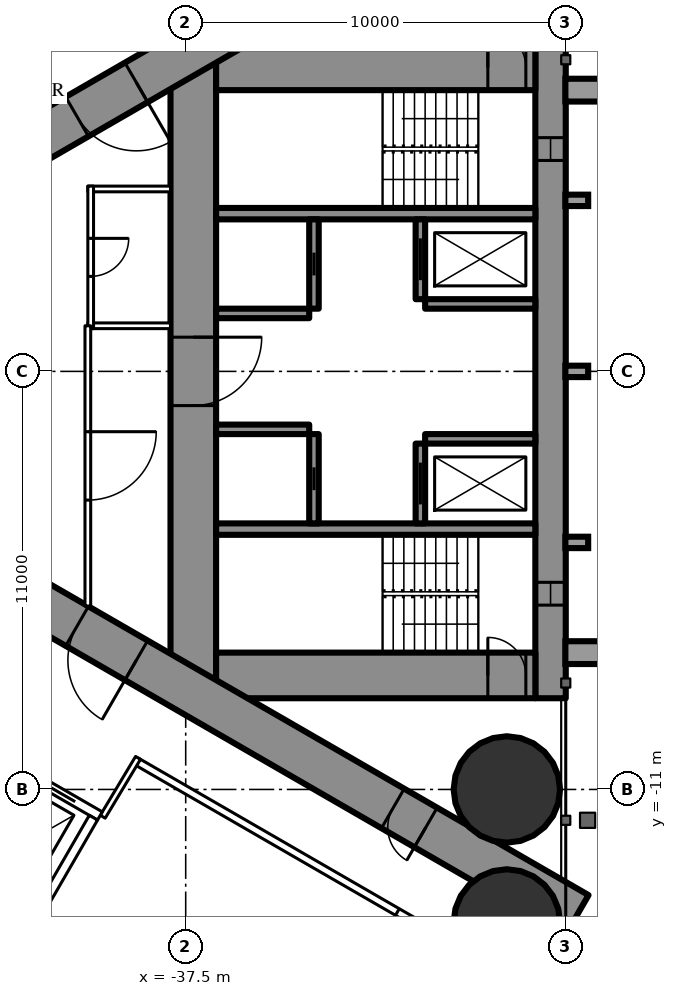
"""IFC4 building model, lengths in metres.
Left out: names, types, materials, properties, quantities, classifications, styles, units other than length and angle.
Written with IfcOpenShell. Run it as: python <this file> out.ifc"""

import sys

from ifc_helpers import new_model, si_unit, direction, frame, frame_2d, origin, origin_2d, place, context, subcontext, project, spatial, rectangle, circle, extrude, element, fill, save


model = new_model("IFC4")
c1 = context("Model", 3, precision=1e-05, world=origin(), true_north=direction((0.0, 1.0)))
c2 = subcontext(c1, "Body", "Model", "MODEL_VIEW")
j1 = project(units=[si_unit("LENGTHUNIT", "METRE"), si_unit("PLANEANGLEUNIT", "RADIAN")], contexts=[c1])
p1 = place(None, origin())
s1 = spatial("IfcSite", under=j1, at=p1, CompositionType="ELEMENT")
p2 = place(p1, origin())
s2 = spatial("IfcBuilding", under=s1, at=p2, CompositionType="ELEMENT")
p3 = place(p2, frame((0.0, 0.0, 184.3)))
s3 = spatial("IfcBuildingStorey", under=s2, at=p3, CompositionType="ELEMENT", Elevation=184.3)
for number, where, z_axis, x_axis in (
    (1, (-29.05, -11.0, 0.0), (0.0, 0.0, 1.0), (1.0, 0.0, 0.0)),
    (2, (-29.05, -14.5, 0.0), (0.0, 0.0, 1.0), (1.0, 0.0, 0.0)),
):
    element("IfcColumn", number, at=place(p3, frame(where, z_axis=z_axis, x_axis=x_axis)), inside=s3, PredefinedType="COLUMN", context=c2, shape_type="SweptSolid", body=[
        extrude(circle(Radius=1.4, at=origin_2d()), origin(), (0.0, 0.0, 1.0), 3.5),
    ])
p4 = place(p3, frame((-27.9, 8.6, 0.0), z_axis=(0.0, 0.0, 1.0), x_axis=(0.0, -1.0, 0.0)))
e3 = element("IfcWall", 3, at=p4, inside=s3, PredefinedType="SHEAR", context=c2, shape_type="SweptSolid", body=[
    extrude(rectangle(XDim=17.2, YDim=0.8, at=frame_2d((8.6, 0.0))), origin(), (0.0, 0.0, 1.0), 3.5),
])
p5 = place(p4, frame((2.45, 0.0, 0.6)))
e4 = element("IfcOpeningElement", 4, at=p5, cuts=e3, PredefinedType="OPENING", context=c2, shape_type="SweptSolid", body=[
    extrude(rectangle(XDim=0.6, YDim=2.1, at=frame_2d((0.3, 1.05))), frame((0.0, 0.41, 0.0), z_axis=(0.0, -1.0, 0.0), x_axis=(1.0, 0.0, 0.0)), (0.0, 0.0, 1.0), 0.82),
])
p6 = place(p4, frame((14.15, 0.0, 0.6)))
e5 = element("IfcOpeningElement", 5, at=p6, cuts=e3, PredefinedType="OPENING", context=c2, shape_type="SweptSolid", body=[
    extrude(rectangle(XDim=0.6, YDim=2.1, at=frame_2d((0.3, 1.05))), frame((0.0, 0.41, 0.0), z_axis=(0.0, -1.0, 0.0), x_axis=(1.0, 0.0, 0.0)), (0.0, 0.0, 1.0), 0.82),
])
p7 = place(p3, frame((-37.3, 8.6, 0.0), z_axis=(0.0, 0.0, 1.0), x_axis=(0.0, -1.0, 0.0)))
e6 = element("IfcWall", 6, at=p7, inside=s3, PredefinedType="SHEAR", context=c2, shape_type="SweptSolid", body=[
    extrude(rectangle(XDim=17.2, YDim=1.2, at=frame_2d((8.6, 0.0))), origin(), (0.0, 0.0, 1.0), 3.5),
])
p8 = place(p7, frame((7.7, 0.0, 0.0)))
e7 = element("IfcOpeningElement", 7, at=p8, cuts=e6, PredefinedType="OPENING", context=c2, shape_type="SweptSolid", body=[
    extrude(rectangle(XDim=1.8, YDim=2.2, at=frame_2d((0.9, 1.1))), frame((0.0, 0.61, 0.0), z_axis=(0.0, -1.0, 0.0), x_axis=(1.0, 0.0, 0.0)), (0.0, 0.0, 1.0), 1.22),
])
p9 = place(p3, frame((-28.3, 8.0, 0.0), z_axis=(0.0, 0.0, 1.0), x_axis=(-1.0, 0.0, 0.0)))
e8 = element("IfcWall", 8, at=p9, inside=s3, PredefinedType="SHEAR", context=c2, shape_type="SweptSolid", body=[
    extrude(rectangle(XDim=8.4, YDim=1.2, at=frame_2d((4.2, 0.0))), origin(), (0.0, 0.0, 1.0), 3.5),
])
p10 = place(p9, frame((0.25, 0.0, 0.0)))
e9 = element("IfcOpeningElement", 9, at=p10, cuts=e8, PredefinedType="OPENING", context=c2, shape_type="SweptSolid", body=[
    extrude(rectangle(XDim=1.0, YDim=2.2, at=frame_2d((0.5, 1.1))), frame((0.0, 0.61, 0.0), z_axis=(0.0, -1.0, 0.0), x_axis=(1.0, 0.0, 0.0)), (0.0, 0.0, 1.0), 1.22),
])
p11 = place(p3, frame((-28.3, -8.0, 0.0), z_axis=(0.0, 0.0, 1.0), x_axis=(-1.0, 0.0, 0.0)))
e10 = element("IfcWall", 10, at=p11, inside=s3, PredefinedType="SHEAR", context=c2, shape_type="SweptSolid", body=[
    extrude(rectangle(XDim=8.4, YDim=1.2, at=frame_2d((4.2, 0.0))), origin(), (0.0, 0.0, 1.0), 3.5),
])
p12 = place(p11, frame((0.25, 0.0, 0.0)))
e11 = element("IfcOpeningElement", 11, at=p12, cuts=e10, PredefinedType="OPENING", context=c2, shape_type="SweptSolid", body=[
    extrude(rectangle(XDim=1.0, YDim=2.2, at=frame_2d((0.5, 1.1))), frame((0.0, 0.61, 0.0), z_axis=(0.0, -1.0, 0.0), x_axis=(1.0, 0.0, 0.0)), (0.0, 0.0, 1.0), 1.22),
])
for number, where, z_axis, x_axis in (
    (12, (-28.3, 4.15, 0.0), (0.0, 0.0, 1.0), (-1.0, 0.0, 0.0)),
    (13, (-28.3, -4.15, 0.0), (0.0, 0.0, 1.0), (-1.0, 0.0, 0.0)),
):
    element("IfcWall", number, at=place(p3, frame(where, z_axis=z_axis, x_axis=x_axis)), inside=s3, PredefinedType="SHEAR", context=c2, shape_type="SweptSolid", body=[
        extrude(rectangle(XDim=8.4, YDim=0.3, at=frame_2d((4.2, 0.0))), origin(), (0.0, 0.0, 1.0), 3.5),
    ])
p13 = place(p3, frame((-31.325, 4.0, 0.0), z_axis=(0.0, 0.0, 1.0), x_axis=(0.0, -1.0, 0.0)))
e14 = element("IfcWall", 14, at=p13, inside=s3, PredefinedType="SHEAR", context=c2, shape_type="SweptSolid", body=[
    extrude(rectangle(XDim=2.1, YDim=0.25, at=frame_2d((1.05, 0.0))), origin(), (0.0, 0.0, 1.0), 3.5),
])
p14 = place(p13, frame((0.5, 0.0, 0.0)))
e15 = element("IfcOpeningElement", 15, at=p14, cuts=e14, PredefinedType="OPENING", context=c2, shape_type="SweptSolid", body=[
    extrude(rectangle(XDim=1.1, YDim=2.2, at=frame_2d((0.55, 1.1))), frame((0.0, 0.135, 0.0), z_axis=(0.0, -1.0, 0.0), x_axis=(1.0, 0.0, 0.0)), (0.0, 0.0, 1.0), 0.27),
])
p15 = place(p3, frame((-34.125, 4.0, 0.0), z_axis=(0.0, 0.0, 1.0), x_axis=(0.0, -1.0, 0.0)))
e16 = element("IfcWall", 16, at=p15, inside=s3, PredefinedType="SHEAR", context=c2, shape_type="SweptSolid", body=[
    extrude(rectangle(XDim=2.35, YDim=0.25, at=frame_2d((1.175, 0.0))), origin(), (0.0, 0.0, 1.0), 3.5),
])
p16 = place(p15, frame((0.875, 0.0, 0.0)))
e17 = element("IfcOpeningElement", 17, at=p16, cuts=e16, PredefinedType="OPENING", context=c2, shape_type="SweptSolid", body=[
    extrude(rectangle(XDim=0.6, YDim=2.0, at=frame_2d((0.3, 1.0))), frame((0.0, 0.135, 0.0), z_axis=(0.0, -1.0, 0.0), x_axis=(1.0, 0.0, 0.0)), (0.0, 0.0, 1.0), 0.27),
])
p17 = place(p3, frame((-28.3, 1.775, 0.0), z_axis=(0.0, 0.0, 1.0), x_axis=(-1.0, 0.0, 0.0)))
e18 = element("IfcWall", 18, at=p17, inside=s3, PredefinedType="SHEAR", context=c2, shape_type="SweptSolid", body=[
    extrude(rectangle(XDim=2.9, YDim=0.25, at=frame_2d((1.45, 0.0))), origin(), (0.0, 0.0, 1.0), 3.5),
])
p18 = place(p3, frame((-34.25, 1.525, 0.0), z_axis=(0.0, 0.0, 1.0), x_axis=(-1.0, 0.0, 0.0)))
e19 = element("IfcWall", 19, at=p18, inside=s3, PredefinedType="SHEAR", context=c2, shape_type="SweptSolid", body=[
    extrude(rectangle(XDim=2.45, YDim=0.25, at=frame_2d((1.225, 0.0))), origin(), (0.0, 0.0, 1.0), 3.5),
])
p19 = place(p3, frame((-31.325, -1.9, 0.0), z_axis=(0.0, 0.0, 1.0), x_axis=(0.0, -1.0, 0.0)))
e20 = element("IfcWall", 20, at=p19, inside=s3, PredefinedType="SHEAR", context=c2, shape_type="SweptSolid", body=[
    extrude(rectangle(XDim=2.1, YDim=0.25, at=frame_2d((1.05, 0.0))), origin(), (0.0, 0.0, 1.0), 3.5),
])
p20 = place(p19, frame((0.5, 0.0, 0.0)))
e21 = element("IfcOpeningElement", 21, at=p20, cuts=e20, PredefinedType="OPENING", context=c2, shape_type="SweptSolid", body=[
    extrude(rectangle(XDim=1.1, YDim=2.2, at=frame_2d((0.55, 1.1))), frame((0.0, 0.135, 0.0), z_axis=(0.0, -1.0, 0.0), x_axis=(1.0, 0.0, 0.0)), (0.0, 0.0, 1.0), 0.27),
])
p21 = place(p3, frame((-34.125, -1.65, 0.0), z_axis=(0.0, 0.0, 1.0), x_axis=(0.0, -1.0, 0.0)))
e22 = element("IfcWall", 22, at=p21, inside=s3, PredefinedType="SHEAR", context=c2, shape_type="SweptSolid", body=[
    extrude(rectangle(XDim=2.35, YDim=0.25, at=frame_2d((1.175, 0.0))), origin(), (0.0, 0.0, 1.0), 3.5),
])
p22 = place(p21, frame((0.875, 0.0, 0.0)))
e23 = element("IfcOpeningElement", 23, at=p22, cuts=e22, PredefinedType="OPENING", context=c2, shape_type="SweptSolid", body=[
    extrude(rectangle(XDim=0.6, YDim=2.0, at=frame_2d((0.3, 1.0))), frame((0.0, 0.135, 0.0), z_axis=(0.0, -1.0, 0.0), x_axis=(1.0, 0.0, 0.0)), (0.0, 0.0, 1.0), 0.27),
])
p23 = place(p3, frame((-28.3, -1.775, 0.0), z_axis=(0.0, 0.0, 1.0), x_axis=(-1.0, 0.0, 0.0)))
e24 = element("IfcWall", 24, at=p23, inside=s3, PredefinedType="SHEAR", context=c2, shape_type="SweptSolid", body=[
    extrude(rectangle(XDim=2.9, YDim=0.25, at=frame_2d((1.45, 0.0))), origin(), (0.0, 0.0, 1.0), 3.5),
])
p24 = place(p3, frame((-34.25, -1.525, 0.0), z_axis=(0.0, 0.0, 1.0), x_axis=(-1.0, 0.0, 0.0)))
e25 = element("IfcWall", 25, at=p24, inside=s3, PredefinedType="SHEAR", context=c2, shape_type="SweptSolid", body=[
    extrude(rectangle(XDim=2.45, YDim=0.25, at=frame_2d((1.225, 0.0))), origin(), (0.0, 0.0, 1.0), 3.5),
])
p25 = place(p3, frame((-27.2, 14.3, 0.0), z_axis=(0.0, 0.0, 1.0), x_axis=(-0.866026593062, -0.499997940104, 0.0)))
e26 = element("IfcWall", 26, at=p25, inside=s3, PredefinedType="SHEAR", context=c2, shape_type="SweptSolid", body=[
    extrude(rectangle(XDim=28.946, YDim=1.2, at=frame_2d((14.473, 0.0))), origin(), (0.0, 0.0, 1.0), 3.5),
])
p26 = place(p25, frame((4.6, 0.0, 0.0)))
e27 = element("IfcOpeningElement", 27, at=p26, cuts=e26, PredefinedType="OPENING", context=c2, shape_type="SweptSolid", body=[
    extrude(rectangle(XDim=1.0, YDim=2.2, at=frame_2d((0.5, 1.1))), frame((0.0, 0.61, 0.0), z_axis=(0.0, -1.0, 0.0), x_axis=(1.0, 0.0, 0.0)), (0.0, 0.0, 1.0), 1.22),
])
p27 = place(p25, frame((13.395, 0.0, 0.0)))
e28 = element("IfcOpeningElement", 28, at=p27, cuts=e26, PredefinedType="OPENING", context=c2, shape_type="SweptSolid", body=[
    extrude(rectangle(XDim=1.8, YDim=2.2, at=frame_2d((0.9, 1.1))), frame((0.0, 0.61, 0.0), z_axis=(0.0, -1.0, 0.0), x_axis=(1.0, 0.0, 0.0)), (0.0, 0.0, 1.0), 1.22),
])
p28 = place(p3, frame((-27.2, -14.3, 0.0), z_axis=(0.0, 0.0, 1.0), x_axis=(-0.866024021859, 0.500002393557, 0.0)))
e29 = element("IfcWall", 29, at=p28, inside=s3, PredefinedType="SHEAR", context=c2, shape_type="SweptSolid", body=[
    extrude(rectangle(XDim=27.907, YDim=1.2, at=frame_2d((13.954, 0.0))), origin(), (0.0, 0.0, 1.0), 3.5),
])
p29 = place(p28, frame((4.6, 0.0, 0.0)))
e30 = element("IfcOpeningElement", 30, at=p29, cuts=e29, PredefinedType="OPENING", context=c2, shape_type="SweptSolid", body=[
    extrude(rectangle(XDim=1.0, YDim=2.2, at=frame_2d((0.5, 1.1))), frame((0.0, 0.61, 0.0), z_axis=(0.0, -1.0, 0.0), x_axis=(1.0, 0.0, 0.0)), (0.0, 0.0, 1.0), 1.22),
])
p30 = place(p28, frame((13.395, 0.0, 0.0)))
e31 = element("IfcOpeningElement", 31, at=p30, cuts=e29, PredefinedType="OPENING", context=c2, shape_type="SweptSolid", body=[
    extrude(rectangle(XDim=1.8, YDim=2.2, at=frame_2d((0.9, 1.1))), frame((0.0, 0.61, 0.0), z_axis=(0.0, -1.0, 0.0), x_axis=(1.0, 0.0, 0.0)), (0.0, 0.0, 1.0), 1.22),
])
p31 = place(p3, frame((-27.86, -16.575, 0.0), z_axis=(0.0, 0.0, 1.0), x_axis=(-0.866027756871, 0.499995924312, 0.0)))
e32 = element("IfcWall", 32, at=p31, inside=s3, PredefinedType="PARTITIONING", context=c2, shape_type="SweptSolid", body=[
    extrude(rectangle(XDim=12.622, YDim=0.2, at=frame_2d((6.311, 0.0))), origin(), (0.0, 0.0, 1.0), 3.25),
])
p32 = place(p31, frame((3.75, 0.0, 0.0)))
e33 = element("IfcOpeningElement", 33, at=p32, cuts=e32, PredefinedType="OPENING", context=c2, shape_type="SweptSolid", body=[
    extrude(rectangle(XDim=0.95, YDim=2.2, at=frame_2d((0.475, 1.1))), frame((0.0, 0.11, 0.0), z_axis=(0.0, -1.0, 0.0), x_axis=(1.0, 0.0, 0.0)), (0.0, 0.0, 1.0), 0.22),
])
p33 = place(p3, frame((-39.683, -11.718, 0.0), z_axis=(0.0, 0.0, 1.0), x_axis=(0.514336634837, 0.857588377991, 0.0)))
e34 = element("IfcWall", 34, at=p33, inside=s3, PredefinedType="PARTITIONING", context=c2, shape_type="SweptSolid", body=[
    extrude(rectangle(XDim=1.805, YDim=0.15, at=frame_2d((0.903, 0.0))), origin(), (0.0, 0.0, 1.0), 3.25),
])
for number, where, z_axis, x_axis in (
    (35, (-37.9, 1.2, 0.0), (0.0, 0.0, 1.0), (-1.0, 0.0, 0.0)),
    (36, (-37.9, 4.8, 0.0), (0.0, 0.0, 1.0), (-1.0, 0.0, 0.0)),
):
    element("IfcWall", number, at=place(p3, frame(where, z_axis=z_axis, x_axis=x_axis)), inside=s3, PredefinedType="PARTITIONING", context=c2, shape_type="SweptSolid", body=[
        extrude(rectangle(XDim=2.175, YDim=0.15, at=frame_2d((1.087, 0.0))), origin(), (0.0, 0.0, 1.0), 3.25),
    ])
p34 = place(p3, frame((-40.0, 4.875, 0.0), z_axis=(0.0, 0.0, 1.0), x_axis=(0.0, -1.0, 0.0)))
e37 = element("IfcWall", 37, at=p34, inside=s3, PredefinedType="PARTITIONING", context=c2, shape_type="SweptSolid", body=[
    extrude(rectangle(XDim=3.75, YDim=0.15, at=frame_2d((1.875, 0.0))), origin(), (0.0, 0.0, 1.0), 3.25),
])
p35 = place(p34, frame((1.375, 0.0, 0.0)))
e38 = element("IfcOpeningElement", 38, at=p35, cuts=e37, PredefinedType="OPENING", context=c2, shape_type="SweptSolid", body=[
    extrude(rectangle(XDim=1.0, YDim=2.2, at=frame_2d((0.5, 1.1))), frame((0.0, 0.085, 0.0), z_axis=(0.0, -1.0, 0.0), x_axis=(1.0, 0.0, 0.0)), (0.0, 0.0, 1.0), 0.17),
])
p36 = place(p3, frame((-40.075, 1.2, 0.0), z_axis=(0.0, 0.0, 1.0), x_axis=(0.0, -1.0, 0.0)))
e39 = element("IfcWall", 39, at=p36, inside=s3, PredefinedType="PARTITIONING", context=c2, shape_type="SweptSolid", body=[
    extrude(rectangle(XDim=7.374, YDim=0.15, at=frame_2d((3.687, 0.0))), origin(), (0.0, 0.0, 1.0), 3.25),
])
p37 = place(p36, frame((2.787, 0.0, 0.0)))
e40 = element("IfcOpeningElement", 40, at=p37, cuts=e39, PredefinedType="OPENING", context=c2, shape_type="SweptSolid", body=[
    extrude(rectangle(XDim=1.8, YDim=2.2, at=frame_2d((0.9, 1.1))), frame((0.0, 0.085, 0.0), z_axis=(0.0, -1.0, 0.0), x_axis=(1.0, 0.0, 0.0)), (0.0, 0.0, 1.0), 0.17),
])
p38 = place(p3, frame((-39.758, -11.697, 0.0), z_axis=(0.0, 0.0, 1.0), x_axis=(-0.866024194504, 0.500002094529, 0.0)))
e41 = element("IfcWall", 41, at=p38, inside=s3, PredefinedType="PARTITIONING", context=c2, shape_type="SweptSolid", body=[
    extrude(rectangle(XDim=6.6, YDim=0.25, at=frame_2d((3.3, 0.0))), origin(), (0.0, 0.0, 1.0), 3.25),
])
p39 = place(p38, frame((0.75, 0.0, 0.0)))
e42 = element("IfcOpeningElement", 42, at=p39, cuts=e41, PredefinedType="OPENING", context=c2, shape_type="SweptSolid", body=[
    extrude(rectangle(XDim=1.1, YDim=2.2, at=frame_2d((0.55, 1.1))), frame((0.0, 0.135, 0.0), z_axis=(0.0, -1.0, 0.0), x_axis=(1.0, 0.0, 0.0)), (0.0, 0.0, 1.0), 0.27),
])
p40 = place(p38, frame((2.75, 0.0, 0.0)))
e43 = element("IfcOpeningElement", 43, at=p40, cuts=e41, PredefinedType="OPENING", context=c2, shape_type="SweptSolid", body=[
    extrude(rectangle(XDim=1.1, YDim=2.2, at=frame_2d((0.55, 1.1))), frame((0.0, 0.135, 0.0), z_axis=(0.0, -1.0, 0.0), x_axis=(1.0, 0.0, 0.0)), (0.0, 0.0, 1.0), 0.27),
])
p41 = place(p38, frame((4.75, 0.0, 0.0)))
e44 = element("IfcOpeningElement", 44, at=p41, cuts=e41, PredefinedType="OPENING", context=c2, shape_type="SweptSolid", body=[
    extrude(rectangle(XDim=1.1, YDim=2.2, at=frame_2d((0.55, 1.1))), frame((0.0, 0.135, 0.0), z_axis=(0.0, -1.0, 0.0), x_axis=(1.0, 0.0, 0.0)), (0.0, 0.0, 1.0), 0.27),
])
p42 = place(p3, frame((-39.928, -11.743, 0.0), z_axis=(0.0, 0.0, 1.0), x_axis=(-0.499929347863, -0.866066190972, 0.0)))
e45 = element("IfcWall", 45, at=p42, inside=s3, PredefinedType="PARTITIONING", context=c2, shape_type="SweptSolid", body=[
    extrude(rectangle(XDim=3.201, YDim=0.25, at=frame_2d((1.6, 0.0))), origin(), (0.0, 0.0, 1.0), 3.25),
])
p43 = place(p32, origin())
e46 = element("IfcDoor", 46, at=p43, inside=s3, OperationType="SINGLE_SWING_LEFT", PredefinedType="DOOR", context=c2, shape_type="SweptSolid", body=[
    extrude(rectangle(XDim=0.95, YDim=2.2, at=frame_2d((0.475, 1.1))), frame((0.0, 0.025, 0.0), z_axis=(0.0, -1.0, 0.0), x_axis=(1.0, 0.0, 0.0)), (0.0, 0.0, 1.0), 0.05),
])
fill(e33, e46)
p44 = place(p35, origin())
e47 = element("IfcDoor", 47, at=p44, inside=s3, OperationType="SINGLE_SWING_LEFT", PredefinedType="DOOR", context=c2, shape_type="SweptSolid", body=[
    extrude(rectangle(XDim=1.0, YDim=2.2, at=frame_2d((0.5, 1.1))), frame((0.0, 0.025, 0.0), z_axis=(0.0, -1.0, 0.0), x_axis=(1.0, 0.0, 0.0)), (0.0, 0.0, 1.0), 0.05),
])
fill(e38, e47)
p45 = place(p37, origin())
e48 = element("IfcDoor", 48, at=p45, inside=s3, OperationType="DOUBLE_DOOR_SINGLE_SWING", PredefinedType="DOOR", context=c2, shape_type="SweptSolid", body=[
    extrude(rectangle(XDim=1.8, YDim=2.2, at=frame_2d((0.9, 1.1))), frame((0.0, 0.025, 0.0), z_axis=(0.0, -1.0, 0.0), x_axis=(1.0, 0.0, 0.0)), (0.0, 0.0, 1.0), 0.05),
])
fill(e40, e48)
p46 = place(p27, origin())
e49 = element("IfcDoor", 49, at=p46, inside=s3, OperationType="DOUBLE_DOOR_SINGLE_SWING", PredefinedType="DOOR", context=c2, shape_type="SweptSolid", body=[
    extrude(rectangle(XDim=1.8, YDim=2.2, at=frame_2d((0.9, 1.1))), frame((0.0, 0.025, 0.0), z_axis=(0.0, -1.0, 0.0), x_axis=(1.0, 0.0, 0.0)), (0.0, 0.0, 1.0), 0.05),
])
fill(e28, e49)
p47 = place(p29, origin())
e50 = element("IfcDoor", 50, at=p47, inside=s3, OperationType="SINGLE_SWING_LEFT", PredefinedType="DOOR", context=c2, shape_type="SweptSolid", body=[
    extrude(rectangle(XDim=1.0, YDim=2.2, at=frame_2d((0.5, 1.1))), frame((0.0, 0.025, 0.0), z_axis=(0.0, -1.0, 0.0), x_axis=(1.0, 0.0, 0.0)), (0.0, 0.0, 1.0), 0.05),
])
fill(e30, e50)
p48 = place(p30, origin())
e51 = element("IfcDoor", 51, at=p48, inside=s3, OperationType="DOUBLE_DOOR_SINGLE_SWING", PredefinedType="DOOR", context=c2, shape_type="SweptSolid", body=[
    extrude(rectangle(XDim=1.8, YDim=2.2, at=frame_2d((0.9, 1.1))), frame((0.0, 0.025, 0.0), z_axis=(0.0, -1.0, 0.0), x_axis=(1.0, 0.0, 0.0)), (0.0, 0.0, 1.0), 0.05),
])
fill(e31, e51)
p49 = place(p8, origin())
e52 = element("IfcDoor", 52, at=p49, inside=s3, OperationType="DOUBLE_DOOR_SINGLE_SWING", PredefinedType="DOOR", context=c2, shape_type="SweptSolid", body=[
    extrude(rectangle(XDim=1.8, YDim=2.2, at=frame_2d((0.9, 1.1))), frame((0.0, 0.025, 0.0), z_axis=(0.0, -1.0, 0.0), x_axis=(1.0, 0.0, 0.0)), (0.0, 0.0, 1.0), 0.05),
])
fill(e7, e52)
p50 = place(p10, origin())
e53 = element("IfcDoor", 53, at=p50, inside=s3, OperationType="SINGLE_SWING_RIGHT", PredefinedType="DOOR", context=c2, shape_type="SweptSolid", body=[
    extrude(rectangle(XDim=1.0, YDim=2.2, at=frame_2d((0.5, 1.1))), frame((0.0, 0.025, 0.0), z_axis=(0.0, -1.0, 0.0), x_axis=(1.0, 0.0, 0.0)), (0.0, 0.0, 1.0), 0.05),
])
fill(e9, e53)
p51 = place(p12, origin())
e54 = element("IfcDoor", 54, at=p51, inside=s3, OperationType="SINGLE_SWING_RIGHT", PredefinedType="DOOR", context=c2, shape_type="SweptSolid", body=[
    extrude(rectangle(XDim=1.0, YDim=2.2, at=frame_2d((0.5, 1.1))), frame((0.0, 0.025, 0.0), z_axis=(0.0, -1.0, 0.0), x_axis=(1.0, 0.0, 0.0)), (0.0, 0.0, 1.0), 0.05),
])
fill(e11, e54)
p52 = place(p14, origin())
e55 = element("IfcDoor", 55, at=p52, inside=s3, OperationType="SLIDING_TO_LEFT", PredefinedType="USERDEFINED", context=c2, shape_type="SweptSolid", body=[
    extrude(rectangle(XDim=1.1, YDim=2.2, at=frame_2d((0.55, 1.1))), frame((0.0, 0.025, 0.0), z_axis=(0.0, -1.0, 0.0), x_axis=(1.0, 0.0, 0.0)), (0.0, 0.0, 1.0), 0.05),
])
fill(e15, e55)
p53 = place(p20, origin())
e56 = element("IfcDoor", 56, at=p53, inside=s3, OperationType="SLIDING_TO_LEFT", PredefinedType="USERDEFINED", context=c2, shape_type="SweptSolid", body=[
    extrude(rectangle(XDim=1.1, YDim=2.2, at=frame_2d((0.55, 1.1))), frame((0.0, 0.025, 0.0), z_axis=(0.0, -1.0, 0.0), x_axis=(1.0, 0.0, 0.0)), (0.0, 0.0, 1.0), 0.05),
])
fill(e21, e56)
p54 = place(p16, origin())
e57 = element("IfcDoor", 57, at=p54, inside=s3, OperationType="SLIDING_TO_LEFT", PredefinedType="DOOR", context=c2, shape_type="SweptSolid", body=[
    extrude(rectangle(XDim=0.6, YDim=2.0, at=frame_2d((0.3, 1.0))), frame((0.0, 0.025, 0.0), z_axis=(0.0, -1.0, 0.0), x_axis=(1.0, 0.0, 0.0)), (0.0, 0.0, 1.0), 0.05),
])
fill(e17, e57)
p55 = place(p22, origin())
e58 = element("IfcDoor", 58, at=p55, inside=s3, OperationType="SLIDING_TO_LEFT", PredefinedType="DOOR", context=c2, shape_type="SweptSolid", body=[
    extrude(rectangle(XDim=0.6, YDim=2.0, at=frame_2d((0.3, 1.0))), frame((0.0, 0.025, 0.0), z_axis=(0.0, -1.0, 0.0), x_axis=(1.0, 0.0, 0.0)), (0.0, 0.0, 1.0), 0.05),
])
fill(e23, e58)
p56 = place(p39, origin())
e59 = element("IfcDoor", 59, at=p56, inside=s3, OperationType="DOUBLE_DOOR_SLIDING", PredefinedType="USERDEFINED", context=c2, shape_type="SweptSolid", body=[
    extrude(rectangle(XDim=1.1, YDim=2.2, at=frame_2d((0.55, 1.1))), frame((0.0, 0.025, 0.0), z_axis=(0.0, -1.0, 0.0), x_axis=(1.0, 0.0, 0.0)), (0.0, 0.0, 1.0), 0.05),
])
fill(e42, e59)
p57 = place(p5, origin())
e60 = element("IfcWindow", 60, at=p57, inside=s3, PartitioningType="SINGLE_PANEL", PredefinedType="WINDOW", context=c2, shape_type="SweptSolid", body=[
    extrude(rectangle(XDim=0.6, YDim=2.1, at=frame_2d((0.3, 1.05))), frame((0.0, 0.03, 0.0), z_axis=(0.0, -1.0, 0.0), x_axis=(1.0, 0.0, 0.0)), (0.0, 0.0, 1.0), 0.06),
])
fill(e4, e60)
p58 = place(p6, origin())
e61 = element("IfcWindow", 61, at=p58, inside=s3, PartitioningType="SINGLE_PANEL", PredefinedType="WINDOW", context=c2, shape_type="SweptSolid", body=[
    extrude(rectangle(XDim=0.6, YDim=2.1, at=frame_2d((0.3, 1.05))), frame((0.0, 0.03, 0.0), z_axis=(0.0, -1.0, 0.0), x_axis=(1.0, 0.0, 0.0)), (0.0, 0.0, 1.0), 0.06),
])
fill(e5, e61)
save(model, sys.argv[1])
